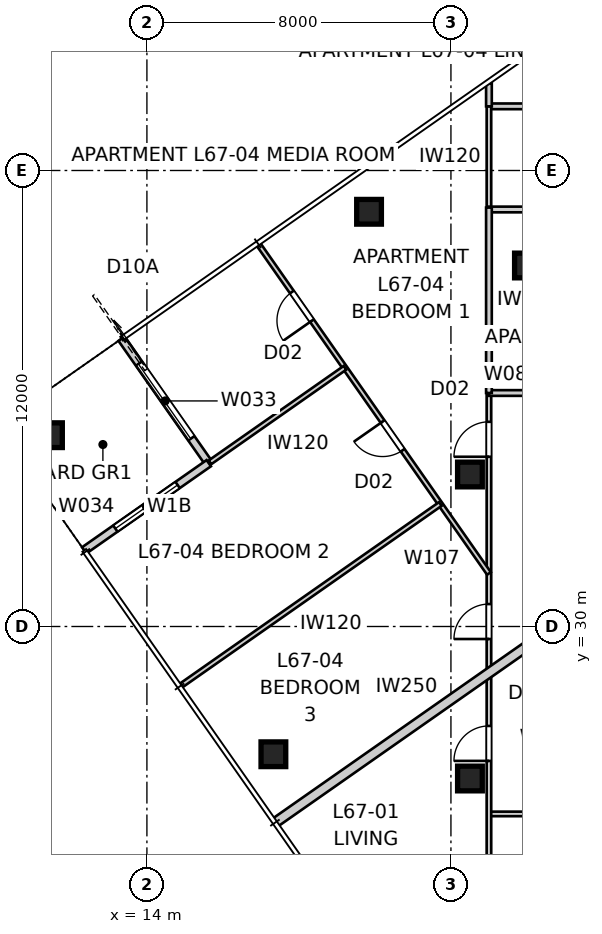
"""IFC4 building model, lengths in metres.
Left out: names, types, materials, properties, quantities, classifications, styles, units other than length and angle.
Written with IfcOpenShell. Run it as: python <this file> out.ifc"""

import sys

from ifc_helpers import new_model, si_unit, direction, frame, frame_2d, origin, origin_2d, place, context, subcontext, project, spatial, rectangle, extrude, element, fill, save


model = new_model("IFC4")
c1 = context("Model", 3, precision=1e-05, world=origin(), true_north=direction((0.0, 1.0)))
c2 = subcontext(c1, "Body", "Model", "MODEL_VIEW")
j1 = project(units=[si_unit("LENGTHUNIT", "METRE"), si_unit("PLANEANGLEUNIT", "RADIAN")], contexts=[c1])
p1 = place(None, origin())
s1 = spatial("IfcSite", under=j1, at=p1, CompositionType="ELEMENT")
p2 = place(p1, origin())
s2 = spatial("IfcBuilding", under=s1, at=p2, CompositionType="ELEMENT")
p3 = place(p2, frame((0.0, 0.0, 243.8)))
s3 = spatial("IfcBuildingStorey", under=s2, at=p3, CompositionType="ELEMENT", Elevation=243.8)
for number, where, z_axis, x_axis in (
    (1, (19.845, 40.914, 0.0), (0.0, 0.0, 1.0), (1.0, 0.0, 0.0)),
    (2, (11.449, 35.034, 0.0), (0.0, 0.0, 1.0), (1.0, 0.0, 0.0)),
    (3, (17.328, 26.638, 0.0), (0.0, 0.0, 1.0), (1.0, 0.0, 0.0)),
    (4, (24.0, 39.5, 0.0), (0.0, 0.0, 1.0), (1.0, 0.0, 0.0)),
    (5, (22.5, 34.0, 0.0), (0.0, 0.0, 1.0), (1.0, 0.0, 0.0)),
    (6, (22.5, 26.0, 0.0), (0.0, 0.0, 1.0), (1.0, 0.0, 0.0)),
):
    element("IfcColumn", number, at=place(p3, frame(where, z_axis=z_axis, x_axis=x_axis)), inside=s3, PredefinedType="COLUMN", context=c2, shape_type="SweptSolid", body=[
        extrude(rectangle(XDim=0.65, YDim=0.65, at=origin_2d()), origin(), (0.0, 0.0, 1.0), 3.4),
    ])
p4 = place(p3, frame((13.333, 37.574, 0.0), z_axis=(0.0, 0.0, 1.0), x_axis=(0.573556557423, -0.819165963305, 0.0)))
e7 = element("IfcWall", 7, at=p4, inside=s3, PredefinedType="SOLIDWALL", context=c2, shape_type="SweptSolid", body=[
    extrude(rectangle(XDim=4.0, YDim=0.2, at=frame_2d((2.0, 0.0))), origin(), (0.0, 0.0, 1.0), 3.25),
])
p5 = place(p4, frame((0.8, 0.0, 0.0)))
e8 = element("IfcOpeningElement", 8, at=p5, cuts=e7, PredefinedType="OPENING", context=c2, shape_type="SweptSolid", body=[
    extrude(rectangle(XDim=2.4, YDim=2.1, at=frame_2d((1.2, 1.05))), frame((0.0, 0.11, 0.0), z_axis=(0.0, -1.0, 0.0), x_axis=(1.0, 0.0, 0.0)), (0.0, 0.0, 1.0), 0.22),
])
p6 = place(p3, frame((15.627, 34.298, 0.0), z_axis=(0.0, 0.0, 1.0), x_axis=(-0.819137286189, -0.573597512525, 0.0)))
e9 = element("IfcWall", 9, at=p6, inside=s3, PredefinedType="SOLIDWALL", context=c2, shape_type="SweptSolid", body=[
    extrude(rectangle(XDim=4.0, YDim=0.2, at=frame_2d((2.0, 0.0))), origin(), (0.0, 0.0, 1.0), 3.25),
])
p7 = place(p6, frame((1.0, 0.0, 0.45)))
e10 = element("IfcOpeningElement", 10, at=p7, cuts=e9, PredefinedType="OPENING", context=c2, shape_type="SweptSolid", body=[
    extrude(rectangle(XDim=2.0, YDim=1.8, at=frame_2d((1.0, 0.9))), frame((0.0, 0.11, 0.0), z_axis=(0.0, -1.0, 0.0), x_axis=(1.0, 0.0, 0.0)), (0.0, 0.0, 1.0), 0.22),
])
p8 = place(p3, frame((17.369, 24.836, 0.0), z_axis=(0.0, 0.0, 1.0), x_axis=(0.81915902312, 0.573566469418, 0.0)))
e11 = element("IfcWall", 11, at=p8, inside=s3, PredefinedType="PARTITIONING", context=c2, shape_type="SweptSolid", body=[
    extrude(rectangle(XDim=9.756, YDim=0.25, at=frame_2d((4.878, 0.0))), origin(), (0.0, 0.0, 1.0), 3.25),
])
p9 = place(p3, frame((27.9, 25.068, 0.0), z_axis=(0.0, 0.0, 1.0), x_axis=(-1.0, 0.0, 0.0)))
e12 = element("IfcWall", 12, at=p9, inside=s3, PredefinedType="PARTITIONING", context=c2, shape_type="SweptSolid", body=[
    extrude(rectangle(XDim=4.9, YDim=0.12, at=frame_2d((2.45, 0.0))), origin(), (0.0, 0.0, 1.0), 3.25),
])
p10 = place(p9, frame((2.59, 0.0, 0.0)))
e13 = element("IfcOpeningElement", 13, at=p10, cuts=e12, PredefinedType="OPENING", context=c2, shape_type="SweptSolid", body=[
    extrude(rectangle(XDim=0.92, YDim=2.34, at=frame_2d((0.46, 1.17))), frame((0.0, 0.07, 0.0), z_axis=(0.0, -1.0, 0.0), x_axis=(1.0, 0.0, 0.0)), (0.0, 0.0, 1.0), 0.14),
])
p11 = place(p3, frame((23.0, 16.864, 0.0), z_axis=(0.0, 0.0, 1.0), x_axis=(0.0, 1.0, 0.0)))
e14 = element("IfcWall", 14, at=p11, inside=s3, PredefinedType="PARTITIONING", context=c2, shape_type="SweptSolid", body=[
    extrude(rectangle(XDim=19.28, YDim=0.12, at=frame_2d((9.64, 0.0))), origin(), (0.0, 0.0, 1.0), 2.55),
])
p12 = place(p11, frame((9.599, 0.0, 0.0)))
e15 = element("IfcOpeningElement", 15, at=p12, cuts=e14, PredefinedType="OPENING", context=c2, shape_type="SweptSolid", body=[
    extrude(rectangle(XDim=0.92, YDim=2.34, at=frame_2d((0.46, 1.17))), frame((0.0, 0.07, 0.0), z_axis=(0.0, -1.0, 0.0), x_axis=(1.0, 0.0, 0.0)), (0.0, 0.0, 1.0), 0.14),
])
p13 = place(p11, frame((17.603, 0.0, 0.0)))
e16 = element("IfcOpeningElement", 16, at=p13, cuts=e14, PredefinedType="OPENING", context=c2, shape_type="SweptSolid", body=[
    extrude(rectangle(XDim=0.92, YDim=2.34, at=frame_2d((0.46, 1.17))), frame((0.0, 0.07, 0.0), z_axis=(0.0, -1.0, 0.0), x_axis=(1.0, 0.0, 0.0)), (0.0, 0.0, 1.0), 0.14),
])
p14 = place(p11, frame((12.806, 0.0, 0.0)))
e17 = element("IfcOpeningElement", 17, at=p14, cuts=e14, PredefinedType="OPENING", context=c2, shape_type="SweptSolid", body=[
    extrude(rectangle(XDim=0.92, YDim=2.34, at=frame_2d((0.46, 1.17))), frame((0.0, 0.07, 0.0), z_axis=(0.0, -1.0, 0.0), x_axis=(1.0, 0.0, 0.0)), (0.0, 0.0, 1.0), 0.14),
])
p15 = place(p3, frame((23.0, 36.145, 0.0), z_axis=(0.0, 0.0, 1.0), x_axis=(1.0, 0.0, 0.0)))
e18 = element("IfcWall", 18, at=p15, inside=s3, PredefinedType="SOLIDWALL", context=c2, shape_type="SweptSolid", body=[
    extrude(rectangle(XDim=4.9, YDim=0.15, at=frame_2d((2.45, 0.0))), origin(), (0.0, 0.0, 1.0), 3.25),
])
p16 = place(p15, frame((1.99, 0.0, 0.0)))
e19 = element("IfcOpeningElement", 19, at=p16, cuts=e18, PredefinedType="OPENING", context=c2, shape_type="SweptSolid", body=[
    extrude(rectangle(XDim=0.92, YDim=2.34, at=frame_2d((0.46, 1.17))), frame((0.0, 0.085, 0.0), z_axis=(0.0, -1.0, 0.0), x_axis=(1.0, 0.0, 0.0)), (0.0, 0.0, 1.0), 0.17),
])
p17 = place(p3, frame((23.0, 43.688, 0.0), z_axis=(0.0, 0.0, 1.0), x_axis=(1.0, 0.0, 0.0)))
e20 = element("IfcWall", 20, at=p17, inside=s3, PredefinedType="SOLIDWALL", context=c2, shape_type="SweptSolid", body=[
    extrude(rectangle(XDim=5.708, YDim=0.15, at=frame_2d((2.854, 0.0))), origin(), (0.0, 0.0, 1.0), 3.25),
])
p18 = place(p17, frame((2.374, 0.0, 0.0)))
e21 = element("IfcOpeningElement", 21, at=p18, cuts=e20, PredefinedType="OPENING", context=c2, shape_type="SweptSolid", body=[
    extrude(rectangle(XDim=0.96, YDim=2.1, at=frame_2d((0.48, 1.05))), frame((0.0, 0.085, 0.0), z_axis=(0.0, -1.0, 0.0), x_axis=(1.0, 0.0, 0.0)), (0.0, 0.0, 1.0), 0.17),
])
p19 = place(p3, frame((23.0, 41.024, 0.0), z_axis=(0.0, 0.0, 1.0), x_axis=(0.0, 1.0, 0.0)))
e22 = element("IfcWall", 22, at=p19, inside=s3, PredefinedType="PARTITIONING", context=c2, shape_type="SweptSolid", body=[
    extrude(rectangle(XDim=2.665, YDim=0.12, at=frame_2d((1.332, 0.0))), origin(), (0.0, 0.0, 1.0), 3.25),
])
p20 = place(p3, frame((27.9, 40.974, 0.0), z_axis=(0.0, 0.0, 1.0), x_axis=(-1.0, 0.0, 0.0)))
e23 = element("IfcWall", 23, at=p20, inside=s3, PredefinedType="SOLIDWALL", context=c2, shape_type="SweptSolid", body=[
    extrude(rectangle(XDim=4.9, YDim=0.15, at=frame_2d((2.45, 0.0))), origin(), (0.0, 0.0, 1.0), 3.25),
])
p21 = place(p20, frame((1.97, 0.0, 0.0)))
e24 = element("IfcOpeningElement", 24, at=p21, cuts=e23, PredefinedType="OPENING", context=c2, shape_type="SweptSolid", body=[
    extrude(rectangle(XDim=0.96, YDim=2.1, at=frame_2d((0.48, 1.05))), frame((0.0, 0.085, 0.0), z_axis=(0.0, -1.0, 0.0), x_axis=(1.0, 0.0, 0.0)), (0.0, 0.0, 1.0), 0.17),
])
p22 = place(p3, frame((23.0, 43.688, 0.0), z_axis=(0.0, 0.0, 1.0), x_axis=(0.0, 1.0, 0.0)))
e25 = element("IfcWall", 25, at=p22, inside=s3, PredefinedType="SOLIDWALL", context=c2, shape_type="SweptSolid", body=[
    extrude(rectangle(XDim=0.606, YDim=0.15, at=frame_2d((0.303, 0.0))), origin(), (0.0, 0.0, 1.0), 3.25),
])
p23 = place(p3, frame((23.0, 31.396, 0.0), z_axis=(0.0, 0.0, 1.0), x_axis=(-0.573575545802, 0.819152667857, 0.0)))
e26 = element("IfcWall", 26, at=p23, inside=s3, PredefinedType="PARTITIONING", context=c2, shape_type="SweptSolid", body=[
    extrude(rectangle(XDim=10.566, YDim=0.12, at=frame_2d((5.283, 0.0))), origin(), (0.0, 0.0, 1.0), 3.25),
])
p24 = place(p23, frame((3.958, 0.0, 0.0)))
e27 = element("IfcOpeningElement", 27, at=p24, cuts=e26, PredefinedType="OPENING", context=c2, shape_type="SweptSolid", body=[
    extrude(rectangle(XDim=0.92, YDim=2.34, at=frame_2d((0.46, 1.17))), frame((0.0, 0.07, 0.0), z_axis=(0.0, -1.0, 0.0), x_axis=(1.0, 0.0, 0.0)), (0.0, 0.0, 1.0), 0.14),
])
p25 = place(p23, frame((8.121, 0.0, 0.0)))
e28 = element("IfcOpeningElement", 28, at=p25, cuts=e26, PredefinedType="OPENING", context=c2, shape_type="SweptSolid", body=[
    extrude(rectangle(XDim=0.92, YDim=2.34, at=frame_2d((0.46, 1.17))), frame((0.0, 0.07, 0.0), z_axis=(0.0, -1.0, 0.0), x_axis=(1.0, 0.0, 0.0)), (0.0, 0.0, 1.0), 0.14),
])
p26 = place(p3, frame((23.0, 41.024, 0.0), z_axis=(0.0, 0.0, 1.0), x_axis=(0.0, -1.0, 0.0)))
e29 = element("IfcWall", 29, at=p26, inside=s3, PredefinedType="SOLIDWALL", context=c2, shape_type="SweptSolid", body=[
    extrude(rectangle(XDim=4.879, YDim=0.15, at=frame_2d((2.44, 0.0))), origin(), (0.0, 0.0, 1.0), 3.25),
])
p27 = place(p3, frame((21.72, 33.223, 0.0), z_axis=(0.0, 0.0, 1.0), x_axis=(-0.819152099525, -0.573576357466, 0.0)))
e30 = element("IfcWall", 30, at=p27, inside=s3, PredefinedType="PARTITIONING", context=c2, shape_type="SweptSolid", body=[
    extrude(rectangle(XDim=8.335, YDim=0.12, at=frame_2d((4.167, 0.0))), origin(), (0.0, 0.0, 1.0), 3.25),
])
p28 = place(p3, frame((15.66, 34.321, 0.0), z_axis=(0.0, 0.0, 1.0), x_axis=(0.819165768115, 0.573556836197, 0.0)))
e31 = element("IfcWall", 31, at=p28, inside=s3, PredefinedType="PARTITIONING", context=c2, shape_type="SweptSolid", body=[
    extrude(rectangle(XDim=4.335, YDim=0.12, at=frame_2d((2.167, 0.0))), origin(), (0.0, 0.0, 1.0), 3.25),
])
p29 = place(p5, origin())
e32 = element("IfcDoor", 32, at=p29, inside=s3, OperationType="SLIDING_TO_LEFT", PredefinedType="DOOR", context=c2, shape_type="SweptSolid", body=[
    extrude(rectangle(XDim=2.4, YDim=2.1, at=frame_2d((1.2, 1.05))), frame((0.0, 0.025, 0.0), z_axis=(0.0, -1.0, 0.0), x_axis=(1.0, 0.0, 0.0)), (0.0, 0.0, 1.0), 0.05),
])
fill(e8, e32)
p30 = place(p7, origin())
e33 = element("IfcWindow", 33, at=p30, inside=s3, PartitioningType="SINGLE_PANEL", PredefinedType="WINDOW", context=c2, shape_type="SweptSolid", body=[
    extrude(rectangle(XDim=2.0, YDim=1.8, at=frame_2d((1.0, 0.9))), frame((0.0, 0.03, 0.0), z_axis=(0.0, -1.0, 0.0), x_axis=(1.0, 0.0, 0.0)), (0.0, 0.0, 1.0), 0.06),
])
fill(e10, e33)
p31 = place(p12, origin())
e34 = element("IfcDoor", 34, at=p31, inside=s3, OperationType="SINGLE_SWING_LEFT", PredefinedType="DOOR", context=c2, shape_type="SweptSolid", body=[
    extrude(rectangle(XDim=0.92, YDim=2.34, at=frame_2d((0.46, 1.17))), frame((0.0, 0.025, 0.0), z_axis=(0.0, -1.0, 0.0), x_axis=(1.0, 0.0, 0.0)), (0.0, 0.0, 1.0), 0.05),
])
fill(e15, e34)
p32 = place(p13, origin())
e35 = element("IfcDoor", 35, at=p32, inside=s3, OperationType="SINGLE_SWING_LEFT", PredefinedType="DOOR", context=c2, shape_type="SweptSolid", body=[
    extrude(rectangle(XDim=0.92, YDim=2.34, at=frame_2d((0.46, 1.17))), frame((0.0, 0.025, 0.0), z_axis=(0.0, -1.0, 0.0), x_axis=(1.0, 0.0, 0.0)), (0.0, 0.0, 1.0), 0.05),
])
fill(e16, e35)
p33 = place(p14, origin())
e36 = element("IfcDoor", 36, at=p33, inside=s3, OperationType="SINGLE_SWING_LEFT", PredefinedType="DOOR", context=c2, shape_type="SweptSolid", body=[
    extrude(rectangle(XDim=0.92, YDim=2.34, at=frame_2d((0.46, 1.17))), frame((0.0, 0.025, 0.0), z_axis=(0.0, -1.0, 0.0), x_axis=(1.0, 0.0, 0.0)), (0.0, 0.0, 1.0), 0.05),
])
fill(e17, e36)
p34 = place(p24, origin())
e37 = element("IfcDoor", 37, at=p34, inside=s3, OperationType="SINGLE_SWING_RIGHT", PredefinedType="DOOR", context=c2, shape_type="SweptSolid", body=[
    extrude(rectangle(XDim=0.92, YDim=2.34, at=frame_2d((0.46, 1.17))), frame((0.0, 0.025, 0.0), z_axis=(0.0, -1.0, 0.0), x_axis=(1.0, 0.0, 0.0)), (0.0, 0.0, 1.0), 0.05),
])
fill(e27, e37)
p35 = place(p25, origin())
e38 = element("IfcDoor", 38, at=p35, inside=s3, OperationType="SINGLE_SWING_LEFT", PredefinedType="DOOR", context=c2, shape_type="SweptSolid", body=[
    extrude(rectangle(XDim=0.92, YDim=2.34, at=frame_2d((0.46, 1.17))), frame((0.0, 0.025, 0.0), z_axis=(0.0, -1.0, 0.0), x_axis=(1.0, 0.0, 0.0)), (0.0, 0.0, 1.0), 0.05),
])
fill(e28, e38)
save(model, sys.argv[1])
